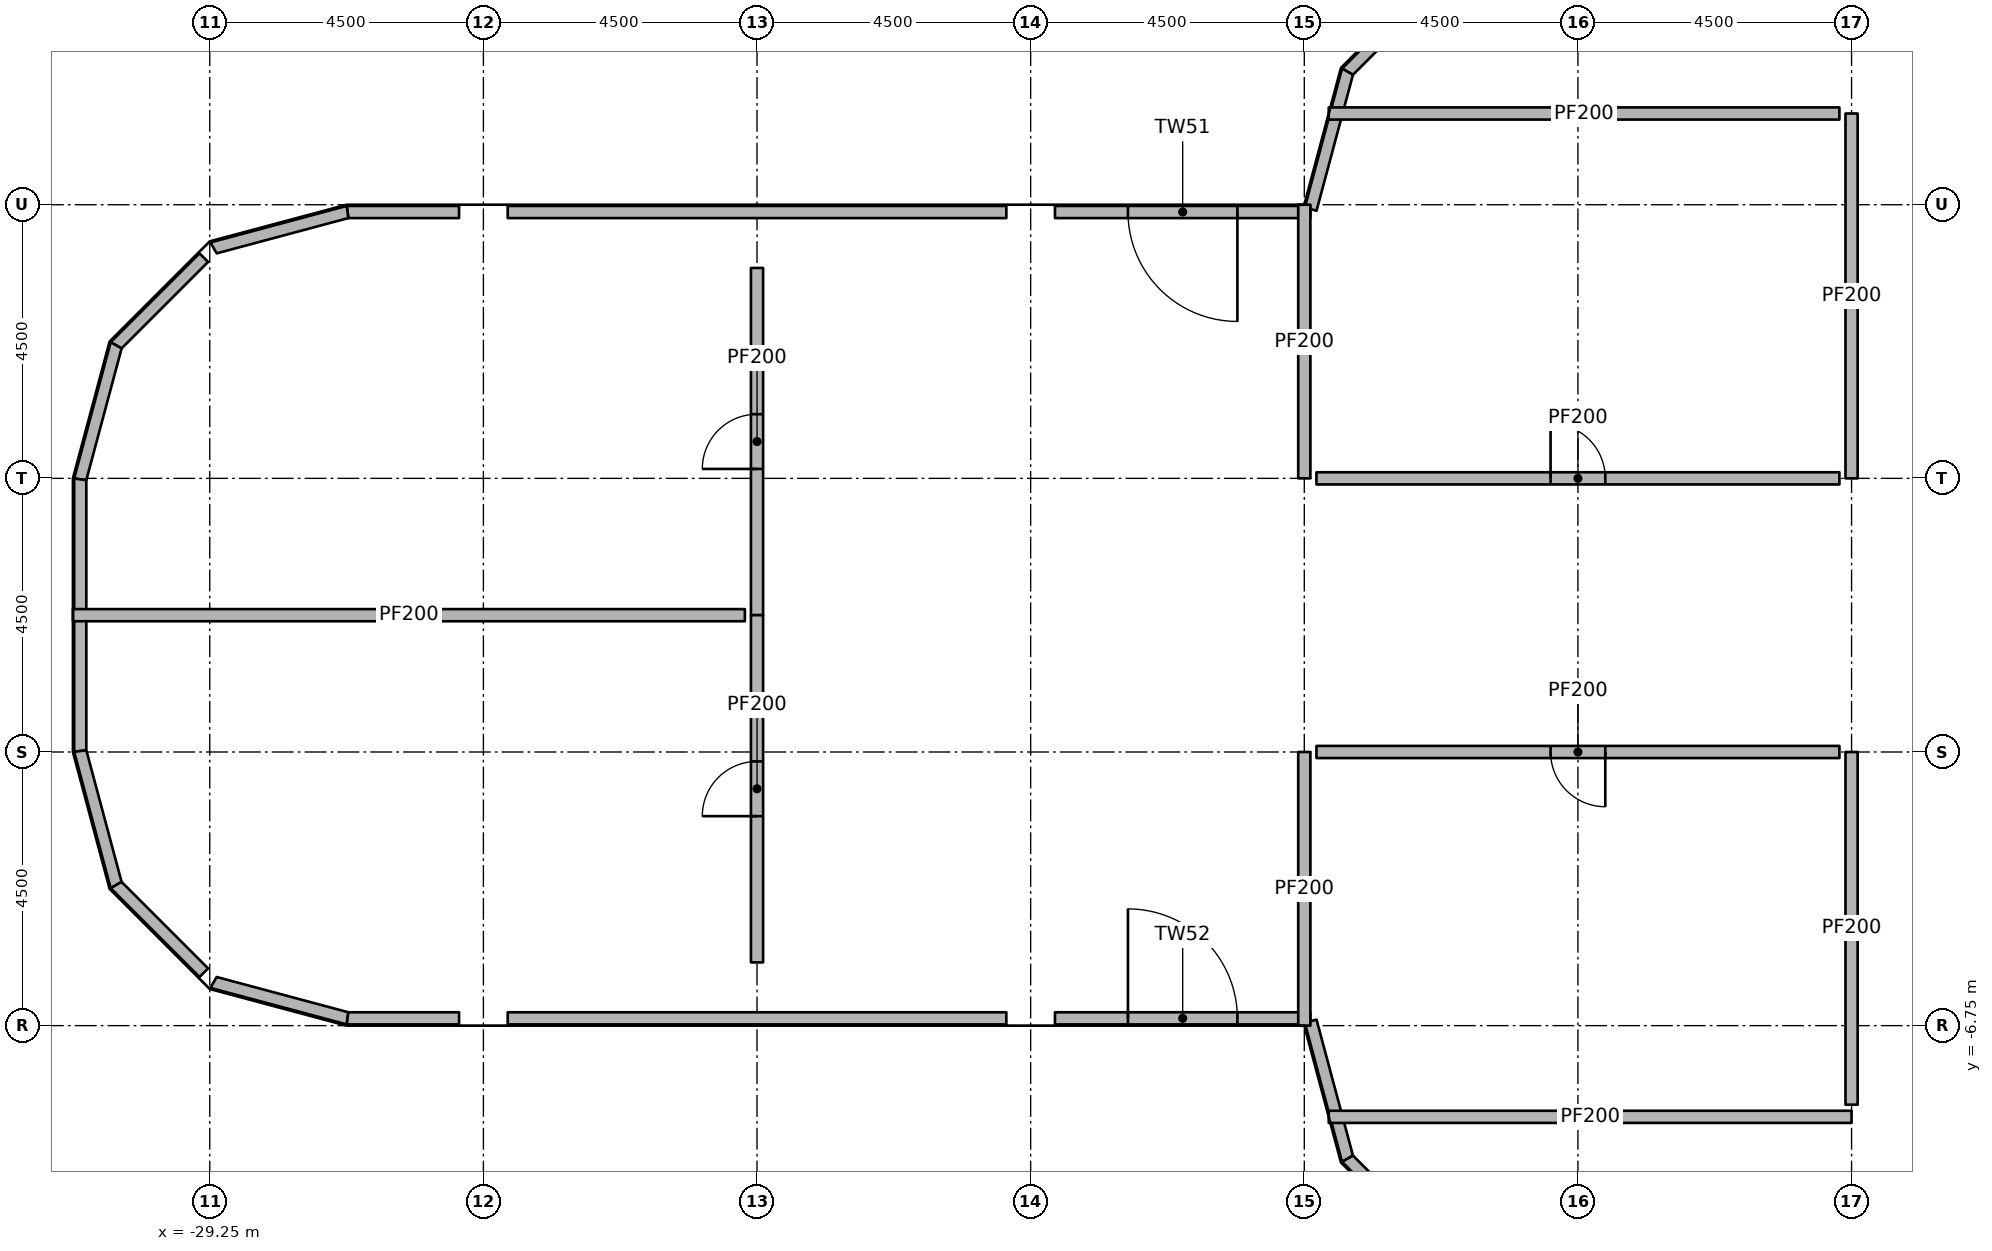
"""IFC4 building model, lengths in metres.
Left out: names, types, materials, properties, quantities, classifications, styles, units other than length and angle.
Written with IfcOpenShell. Run it as: python <this file> out.ifc"""

import sys

from ifc_helpers import new_model, si_unit, direction, frame, frame_2d, origin, origin_2d, place, context, subcontext, project, spatial, polyline, rectangle, outline, extrude, element, fill, save


model = new_model("IFC4")
c1 = context("Model", 3, precision=1e-05, world=origin(), true_north=direction((0.0, 1.0)))
c2 = subcontext(c1, "Body", "Model", "MODEL_VIEW")
j1 = project(units=[si_unit("LENGTHUNIT", "METRE"), si_unit("PLANEANGLEUNIT", "RADIAN")], contexts=[c1])
p1 = place(None, origin())
s1 = spatial("IfcSite", under=j1, at=p1, CompositionType="ELEMENT")
p2 = place(p1, origin())
s2 = spatial("IfcBuilding", under=s1, at=p2, CompositionType="ELEMENT")
p3 = place(p2, frame((0.0, 0.0, 190.4)))
s3 = spatial("IfcBuildingStorey", under=s2, at=p3, CompositionType="ELEMENT", Elevation=190.4)
for number, where, z_axis, x_axis in (
    (1, (-28.908, -5.475, 0.0), (0.0, 0.0, 1.0), (1.0, 0.0, 0.0)),
    (2, (-28.908, 5.475, 0.0), (0.0, 0.0, 1.0), (1.0, 0.0, 0.0)),
    (3, (-24.75, -6.25, 0.0), (0.0, 0.0, 1.0), (1.0, 0.0, 0.0)),
    (4, (-24.75, 6.25, 0.0), (0.0, 0.0, 1.0), (1.0, 0.0, 0.0)),
    (5, (-20.25, -6.11, 0.0), (0.0, 0.0, 1.0), (1.0, 0.0, 0.0)),
    (6, (-20.25, 6.11, 0.0), (0.0, 0.0, 1.0), (1.0, 0.0, 0.0)),
    (7, (-15.75, -6.25, 0.0), (0.0, 0.0, 1.0), (1.0, 0.0, 0.0)),
    (8, (-15.75, 6.25, 0.0), (0.0, 0.0, 1.0), (1.0, 0.0, 0.0)),
    (9, (-10.75, -6.25, 0.0), (0.0, 0.0, 1.0), (1.0, 0.0, 0.0)),
    (10, (-10.75, 6.25, 0.0), (0.0, 0.0, 1.0), (1.0, 0.0, 0.0)),
    (11, (-6.25, -6.25, 0.0), (0.0, 0.0, 1.0), (1.0, 0.0, 0.0)),
    (12, (-6.25, 6.25, 0.0), (0.0, 0.0, 1.0), (1.0, 0.0, 0.0)),
):
    element("IfcColumn", number, at=place(p3, frame(where, z_axis=z_axis, x_axis=x_axis)), inside=s3, PredefinedType="COLUMN", context=c2, shape_type="SweptSolid", body=[
        extrude(rectangle(XDim=0.8, YDim=0.8, at=origin_2d()), origin(), (0.0, 0.0, 1.0), 4.85),
    ])
p4 = place(p3, origin())
e13 = element("IfcWall", 13, at=p4, inside=s3, PredefinedType="SOLIDWALL", context=c2, shape_type="SweptSolid", body=[
    extrude(outline(polyline([(-8.99, 10.629), (-10.629, 8.99), (-10.45, 8.886), (-8.886, 10.45), (-8.99, 10.629)])), origin(), (0.0, 0.0, 1.0), 4.85),
])
p5 = place(p3, origin())
e14 = element("IfcWall", 14, at=p5, inside=s3, PredefinedType="SOLIDWALL", context=c2, shape_type="SweptSolid", body=[
    extrude(outline(polyline([(-10.629, 8.99), (-11.242, 6.702), (-11.049, 6.651), (-10.45, 8.886), (-10.629, 8.99)])), origin(), (0.0, 0.0, 1.0), 4.85),
])
p6 = place(p3, frame((-11.15, 6.63, 0.0), z_axis=(0.0, 0.0, 1.0), x_axis=(-1.0, 0.0, 0.0)))
e15 = element("IfcWall", 15, at=p6, inside=s3, PredefinedType="SOLIDWALL", context=c2, shape_type="SweptSolid", body=[
    extrude(rectangle(XDim=4.2, YDim=0.2, at=frame_2d((2.1, 0.0))), origin(), (0.0, 0.0, 1.0), 4.85),
])
p7 = place(p6, frame((1.2, 0.0, 0.0)))
e16 = element("IfcOpeningElement", 16, at=p7, cuts=e15, PredefinedType="OPENING", context=c2, shape_type="SweptSolid", body=[
    extrude(rectangle(XDim=1.8, YDim=2.4, at=frame_2d((0.9, 1.2))), frame((0.0, 0.11, 0.0), z_axis=(0.0, -1.0, 0.0), x_axis=(1.0, 0.0, 0.0)), (0.0, 0.0, 1.0), 0.22),
])
p8 = place(p3, origin())
e17 = element("IfcWall", 17, at=p8, inside=s3, PredefinedType="SOLIDWALL", context=c2, shape_type="SweptSolid", body=[
    extrude(outline(polyline([(-16.15, 6.73), (-24.35, 6.73), (-24.35, 6.53), (-16.15, 6.53), (-16.15, 6.73)])), origin(), (0.0, 0.0, 1.0), 4.85),
])
p9 = place(p3, origin())
e18 = element("IfcWall", 18, at=p9, inside=s3, PredefinedType="SOLIDWALL", context=c2, shape_type="SweptSolid", body=[
    extrude(outline(polyline([(-25.15, 6.73), (-26.997, 6.73), (-26.971, 6.53), (-25.15, 6.53), (-25.15, 6.73)])), origin(), (0.0, 0.0, 1.0), 4.85),
])
p10 = place(p3, origin())
e19 = element("IfcWall", 19, at=p10, inside=s3, PredefinedType="SOLIDWALL", context=c2, shape_type="SweptSolid", body=[
    extrude(outline(polyline([(-26.997, 6.73), (-29.24, 6.129), (-29.136, 5.95), (-26.971, 6.53), (-26.997, 6.73)])), origin(), (0.0, 0.0, 1.0), 4.85),
])
p11 = place(p3, origin())
e20 = element("IfcWall", 20, at=p11, inside=s3, PredefinedType="SOLIDWALL", context=c2, shape_type="SweptSolid", body=[
    extrude(outline(polyline([(-29.419, 5.95), (-30.879, 4.49), (-30.7, 4.386), (-29.277, 5.809), (-29.419, 5.95)])), origin(), (0.0, 0.0, 1.0), 4.85),
])
p12 = place(p3, origin())
e21 = element("IfcWall", 21, at=p12, inside=s3, PredefinedType="SOLIDWALL", context=c2, shape_type="SweptSolid", body=[
    extrude(outline(polyline([(-30.879, 4.49), (-31.48, 2.247), (-31.28, 2.221), (-30.7, 4.386), (-30.879, 4.49)])), origin(), (0.0, 0.0, 1.0), 4.85),
])
p13 = place(p3, origin())
e22 = element("IfcWall", 22, at=p13, inside=s3, PredefinedType="SOLIDWALL", context=c2, shape_type="SweptSolid", body=[
    extrude(outline(polyline([(-31.48, 2.247), (-31.48, -2.247), (-31.28, -2.221), (-31.28, 2.221), (-31.48, 2.247)])), origin(), (0.0, 0.0, 1.0), 4.85),
])
p14 = place(p3, origin())
e23 = element("IfcWall", 23, at=p14, inside=s3, PredefinedType="SOLIDWALL", context=c2, shape_type="SweptSolid", body=[
    extrude(outline(polyline([(-31.48, -2.247), (-30.879, -4.49), (-30.7, -4.386), (-31.28, -2.221), (-31.48, -2.247)])), origin(), (0.0, 0.0, 1.0), 4.85),
])
p15 = place(p3, origin())
e24 = element("IfcWall", 24, at=p15, inside=s3, PredefinedType="SOLIDWALL", context=c2, shape_type="SweptSolid", body=[
    extrude(outline(polyline([(-30.879, -4.49), (-29.419, -5.95), (-29.277, -5.809), (-30.7, -4.386), (-30.879, -4.49)])), origin(), (0.0, 0.0, 1.0), 4.85),
])
p16 = place(p3, origin())
e25 = element("IfcWall", 25, at=p16, inside=s3, PredefinedType="SOLIDWALL", context=c2, shape_type="SweptSolid", body=[
    extrude(outline(polyline([(-29.24, -6.129), (-26.997, -6.73), (-26.971, -6.53), (-29.136, -5.95), (-29.24, -6.129)])), origin(), (0.0, 0.0, 1.0), 4.85),
])
p17 = place(p3, origin())
e26 = element("IfcWall", 26, at=p17, inside=s3, PredefinedType="SOLIDWALL", context=c2, shape_type="SweptSolid", body=[
    extrude(outline(polyline([(-26.997, -6.73), (-25.15, -6.73), (-25.15, -6.53), (-26.971, -6.53), (-26.997, -6.73)])), origin(), (0.0, 0.0, 1.0), 4.85),
])
p18 = place(p3, origin())
e27 = element("IfcWall", 27, at=p18, inside=s3, PredefinedType="SOLIDWALL", context=c2, shape_type="SweptSolid", body=[
    extrude(outline(polyline([(-24.35, -6.73), (-16.15, -6.73), (-16.15, -6.53), (-24.35, -6.53), (-24.35, -6.73)])), origin(), (0.0, 0.0, 1.0), 4.85),
])
p19 = place(p3, frame((-15.35, -6.63, 0.0), z_axis=(0.0, 0.0, 1.0), x_axis=(1.0, 0.0, 0.0)))
e28 = element("IfcWall", 28, at=p19, inside=s3, PredefinedType="SOLIDWALL", context=c2, shape_type="SweptSolid", body=[
    extrude(rectangle(XDim=4.2, YDim=0.2, at=frame_2d((2.1, 0.0))), origin(), (0.0, 0.0, 1.0), 4.85),
])
p20 = place(p19, frame((1.2, 0.0, 0.0)))
e29 = element("IfcOpeningElement", 29, at=p20, cuts=e28, PredefinedType="OPENING", context=c2, shape_type="SweptSolid", body=[
    extrude(rectangle(XDim=1.8, YDim=2.4, at=frame_2d((0.9, 1.2))), frame((0.0, 0.11, 0.0), z_axis=(0.0, -1.0, 0.0), x_axis=(1.0, 0.0, 0.0)), (0.0, 0.0, 1.0), 0.22),
])
p21 = place(p3, origin())
e30 = element("IfcWall", 30, at=p21, inside=s3, PredefinedType="SOLIDWALL", context=c2, shape_type="SweptSolid", body=[
    extrude(outline(polyline([(-11.242, -6.702), (-10.629, -8.99), (-10.45, -8.886), (-11.049, -6.651), (-11.242, -6.702)])), origin(), (0.0, 0.0, 1.0), 4.85),
])
p22 = place(p3, origin())
e31 = element("IfcWall", 31, at=p22, inside=s3, PredefinedType="SOLIDWALL", context=c2, shape_type="SweptSolid", body=[
    extrude(outline(polyline([(-10.629, -8.99), (-8.99, -10.629), (-8.886, -10.45), (-10.45, -8.886), (-10.629, -8.99)])), origin(), (0.0, 0.0, 1.0), 4.85),
])
p23 = place(p3, frame((-2.25, 2.25, 0.0), z_axis=(0.0, 0.0, 1.0), x_axis=(0.0, 1.0, 0.0)))
e32 = element("IfcWall", 32, at=p23, inside=s3, PredefinedType="PARTITIONING", context=c2, shape_type="SweptSolid", body=[
    extrude(rectangle(XDim=6.0, YDim=0.2, at=frame_2d((3.0, 0.0))), origin(), (0.0, 0.0, 1.0), 3.994),
])
p24 = place(p3, frame((-2.45, 8.25, 0.0), z_axis=(0.0, 0.0, 1.0), x_axis=(-1.0, 0.0, 0.0)))
e33 = element("IfcWall", 33, at=p24, inside=s3, PredefinedType="PARTITIONING", context=c2, shape_type="SweptSolid", body=[
    extrude(rectangle(XDim=8.398, YDim=0.2, at=frame_2d((4.199, 0.0))), origin(), (0.0, 0.0, 1.0), 3.93),
])
p25 = place(p3, frame((-10.848, -8.25, 0.0), z_axis=(0.0, 0.0, 1.0), x_axis=(1.0, 0.0, 0.0)))
e34 = element("IfcWall", 34, at=p25, inside=s3, PredefinedType="PARTITIONING", context=c2, shape_type="SweptSolid", body=[
    extrude(rectangle(XDim=8.598, YDim=0.2, at=frame_2d((4.299, 0.0))), origin(), (0.0, 0.0, 1.0), 3.93),
])
p26 = place(p3, frame((-2.25, -8.05, 0.0), z_axis=(0.0, 0.0, 1.0), x_axis=(0.0, 1.0, 0.0)))
e35 = element("IfcWall", 35, at=p26, inside=s3, PredefinedType="PARTITIONING", context=c2, shape_type="SweptSolid", body=[
    extrude(rectangle(XDim=5.8, YDim=0.2, at=frame_2d((2.9, 0.0))), origin(), (0.0, 0.0, 1.0), 3.994),
])
p27 = place(p3, frame((-11.25, 2.25, 0.0), z_axis=(0.0, 0.0, 1.0), x_axis=(0.0, 1.0, 0.0)))
e36 = element("IfcWall", 36, at=p27, inside=s3, PredefinedType="PARTITIONING", context=c2, shape_type="SweptSolid", body=[
    extrude(rectangle(XDim=4.5, YDim=0.2, at=frame_2d((2.25, 0.0))), origin(), (0.0, 0.0, 1.0), 3.93),
])
p28 = place(p3, frame((-11.05, 2.25, 0.0), z_axis=(0.0, 0.0, 1.0), x_axis=(1.0, 0.0, 0.0)))
e37 = element("IfcWall", 37, at=p28, inside=s3, PredefinedType="PARTITIONING", context=c2, shape_type="SweptSolid", body=[
    extrude(rectangle(XDim=8.6, YDim=0.2, at=frame_2d((4.3, 0.0))), origin(), (0.0, 0.0, 1.0), 4.152),
])
p29 = place(p28, frame((3.85, 0.0, 0.0)))
e38 = element("IfcOpeningElement", 38, at=p29, cuts=e37, PredefinedType="OPENING", context=c2, shape_type="SweptSolid", body=[
    extrude(rectangle(XDim=0.9, YDim=2.1, at=frame_2d((0.45, 1.05))), frame((0.0, 0.11, 0.0), z_axis=(0.0, -1.0, 0.0), x_axis=(1.0, 0.0, 0.0)), (0.0, 0.0, 1.0), 0.22),
])
p30 = place(p3, frame((-11.25, -6.75, 0.0), z_axis=(0.0, 0.0, 1.0), x_axis=(0.0, 1.0, 0.0)))
e39 = element("IfcWall", 39, at=p30, inside=s3, PredefinedType="PARTITIONING", context=c2, shape_type="SweptSolid", body=[
    extrude(rectangle(XDim=4.5, YDim=0.2, at=frame_2d((2.25, 0.0))), origin(), (0.0, 0.0, 1.0), 3.93),
])
p31 = place(p3, frame((-2.45, -2.25, 0.0), z_axis=(0.0, 0.0, 1.0), x_axis=(-1.0, 0.0, 0.0)))
e40 = element("IfcWall", 40, at=p31, inside=s3, PredefinedType="PARTITIONING", context=c2, shape_type="SweptSolid", body=[
    extrude(rectangle(XDim=8.6, YDim=0.2, at=frame_2d((4.3, 0.0))), origin(), (0.0, 0.0, 1.0), 4.152),
])
p32 = place(p31, frame((3.85, 0.0, 0.0)))
e41 = element("IfcOpeningElement", 41, at=p32, cuts=e40, PredefinedType="OPENING", context=c2, shape_type="SweptSolid", body=[
    extrude(rectangle(XDim=0.9, YDim=2.1, at=frame_2d((0.45, 1.05))), frame((0.0, 0.11, 0.0), z_axis=(0.0, -1.0, 0.0), x_axis=(1.0, 0.0, 0.0)), (0.0, 0.0, 1.0), 0.22),
])
p33 = place(p3, frame((-20.25, 0.0, 0.0), z_axis=(0.0, 0.0, 1.0), x_axis=(0.0, 1.0, 0.0)))
e42 = element("IfcWall", 42, at=p33, inside=s3, PredefinedType="PARTITIONING", context=c2, shape_type="SweptSolid", body=[
    extrude(rectangle(XDim=5.71, YDim=0.2, at=frame_2d((2.855, 0.0))), origin(), (0.0, 0.0, 1.0), 4.152),
])
p34 = place(p33, frame((2.405, 0.0, 0.0)))
e43 = element("IfcOpeningElement", 43, at=p34, cuts=e42, PredefinedType="OPENING", context=c2, shape_type="SweptSolid", body=[
    extrude(rectangle(XDim=0.9, YDim=2.1, at=frame_2d((0.45, 1.05))), frame((0.0, 0.11, 0.0), z_axis=(0.0, -1.0, 0.0), x_axis=(1.0, 0.0, 0.0)), (0.0, 0.0, 1.0), 0.22),
])
p35 = place(p3, frame((-20.25, -5.71, 0.0), z_axis=(0.0, 0.0, 1.0), x_axis=(0.0, 1.0, 0.0)))
e44 = element("IfcWall", 44, at=p35, inside=s3, PredefinedType="PARTITIONING", context=c2, shape_type="SweptSolid", body=[
    extrude(rectangle(XDim=5.71, YDim=0.2, at=frame_2d((2.855, 0.0))), origin(), (0.0, 0.0, 1.0), 4.152),
])
p36 = place(p35, frame((2.405, 0.0, 0.0)))
e45 = element("IfcOpeningElement", 45, at=p36, cuts=e44, PredefinedType="OPENING", context=c2, shape_type="SweptSolid", body=[
    extrude(rectangle(XDim=0.9, YDim=2.1, at=frame_2d((0.45, 1.05))), frame((0.0, 0.11, 0.0), z_axis=(0.0, -1.0, 0.0), x_axis=(1.0, 0.0, 0.0)), (0.0, 0.0, 1.0), 0.22),
])
p37 = place(p3, frame((-20.45, 0.0, 0.0), z_axis=(0.0, 0.0, 1.0), x_axis=(-1.0, 0.0, 0.0)))
e46 = element("IfcWall", 46, at=p37, inside=s3, PredefinedType="PARTITIONING", context=c2, shape_type="SweptSolid", body=[
    extrude(rectangle(XDim=11.05, YDim=0.2, at=frame_2d((5.525, 0.0))), origin(), (0.0, 0.0, 1.0), 3.93),
])
p38 = place(p7, origin())
e47 = element("IfcDoor", 47, at=p38, inside=s3, OperationType="SINGLE_SWING_LEFT", PredefinedType="DOOR", context=c2, shape_type="SweptSolid", body=[
    extrude(rectangle(XDim=1.8, YDim=2.4, at=frame_2d((0.9, 1.2))), frame((0.0, 0.025, 0.0), z_axis=(0.0, -1.0, 0.0), x_axis=(1.0, 0.0, 0.0)), (0.0, 0.0, 1.0), 0.05),
])
fill(e16, e47)
p39 = place(p20, origin())
e48 = element("IfcDoor", 48, at=p39, inside=s3, OperationType="SINGLE_SWING_LEFT", PredefinedType="DOOR", context=c2, shape_type="SweptSolid", body=[
    extrude(rectangle(XDim=1.8, YDim=2.4, at=frame_2d((0.9, 1.2))), frame((0.0, 0.025, 0.0), z_axis=(0.0, -1.0, 0.0), x_axis=(1.0, 0.0, 0.0)), (0.0, 0.0, 1.0), 0.05),
])
fill(e29, e48)
p40 = place(p29, origin())
e49 = element("IfcDoor", 49, at=p40, inside=s3, OperationType="SINGLE_SWING_LEFT", PredefinedType="DOOR", context=c2, shape_type="SweptSolid", body=[
    extrude(rectangle(XDim=0.9, YDim=2.1, at=frame_2d((0.45, 1.05))), frame((0.0, 0.025, 0.0), z_axis=(0.0, -1.0, 0.0), x_axis=(1.0, 0.0, 0.0)), (0.0, 0.0, 1.0), 0.05),
])
fill(e38, e49)
p41 = place(p32, origin())
e50 = element("IfcDoor", 50, at=p41, inside=s3, OperationType="SINGLE_SWING_LEFT", PredefinedType="DOOR", context=c2, shape_type="SweptSolid", body=[
    extrude(rectangle(XDim=0.9, YDim=2.1, at=frame_2d((0.45, 1.05))), frame((0.0, 0.025, 0.0), z_axis=(0.0, -1.0, 0.0), x_axis=(1.0, 0.0, 0.0)), (0.0, 0.0, 1.0), 0.05),
])
fill(e41, e50)
p42 = place(p34, origin())
e51 = element("IfcDoor", 51, at=p42, inside=s3, OperationType="SINGLE_SWING_LEFT", PredefinedType="DOOR", context=c2, shape_type="SweptSolid", body=[
    extrude(rectangle(XDim=0.9, YDim=2.1, at=frame_2d((0.45, 1.05))), frame((0.0, 0.025, 0.0), z_axis=(0.0, -1.0, 0.0), x_axis=(1.0, 0.0, 0.0)), (0.0, 0.0, 1.0), 0.05),
])
fill(e43, e51)
p43 = place(p36, origin())
e52 = element("IfcDoor", 52, at=p43, inside=s3, OperationType="SINGLE_SWING_LEFT", PredefinedType="DOOR", context=c2, shape_type="SweptSolid", body=[
    extrude(rectangle(XDim=0.9, YDim=2.1, at=frame_2d((0.45, 1.05))), frame((0.0, 0.025, 0.0), z_axis=(0.0, -1.0, 0.0), x_axis=(1.0, 0.0, 0.0)), (0.0, 0.0, 1.0), 0.05),
])
fill(e45, e52)
save(model, sys.argv[1])
